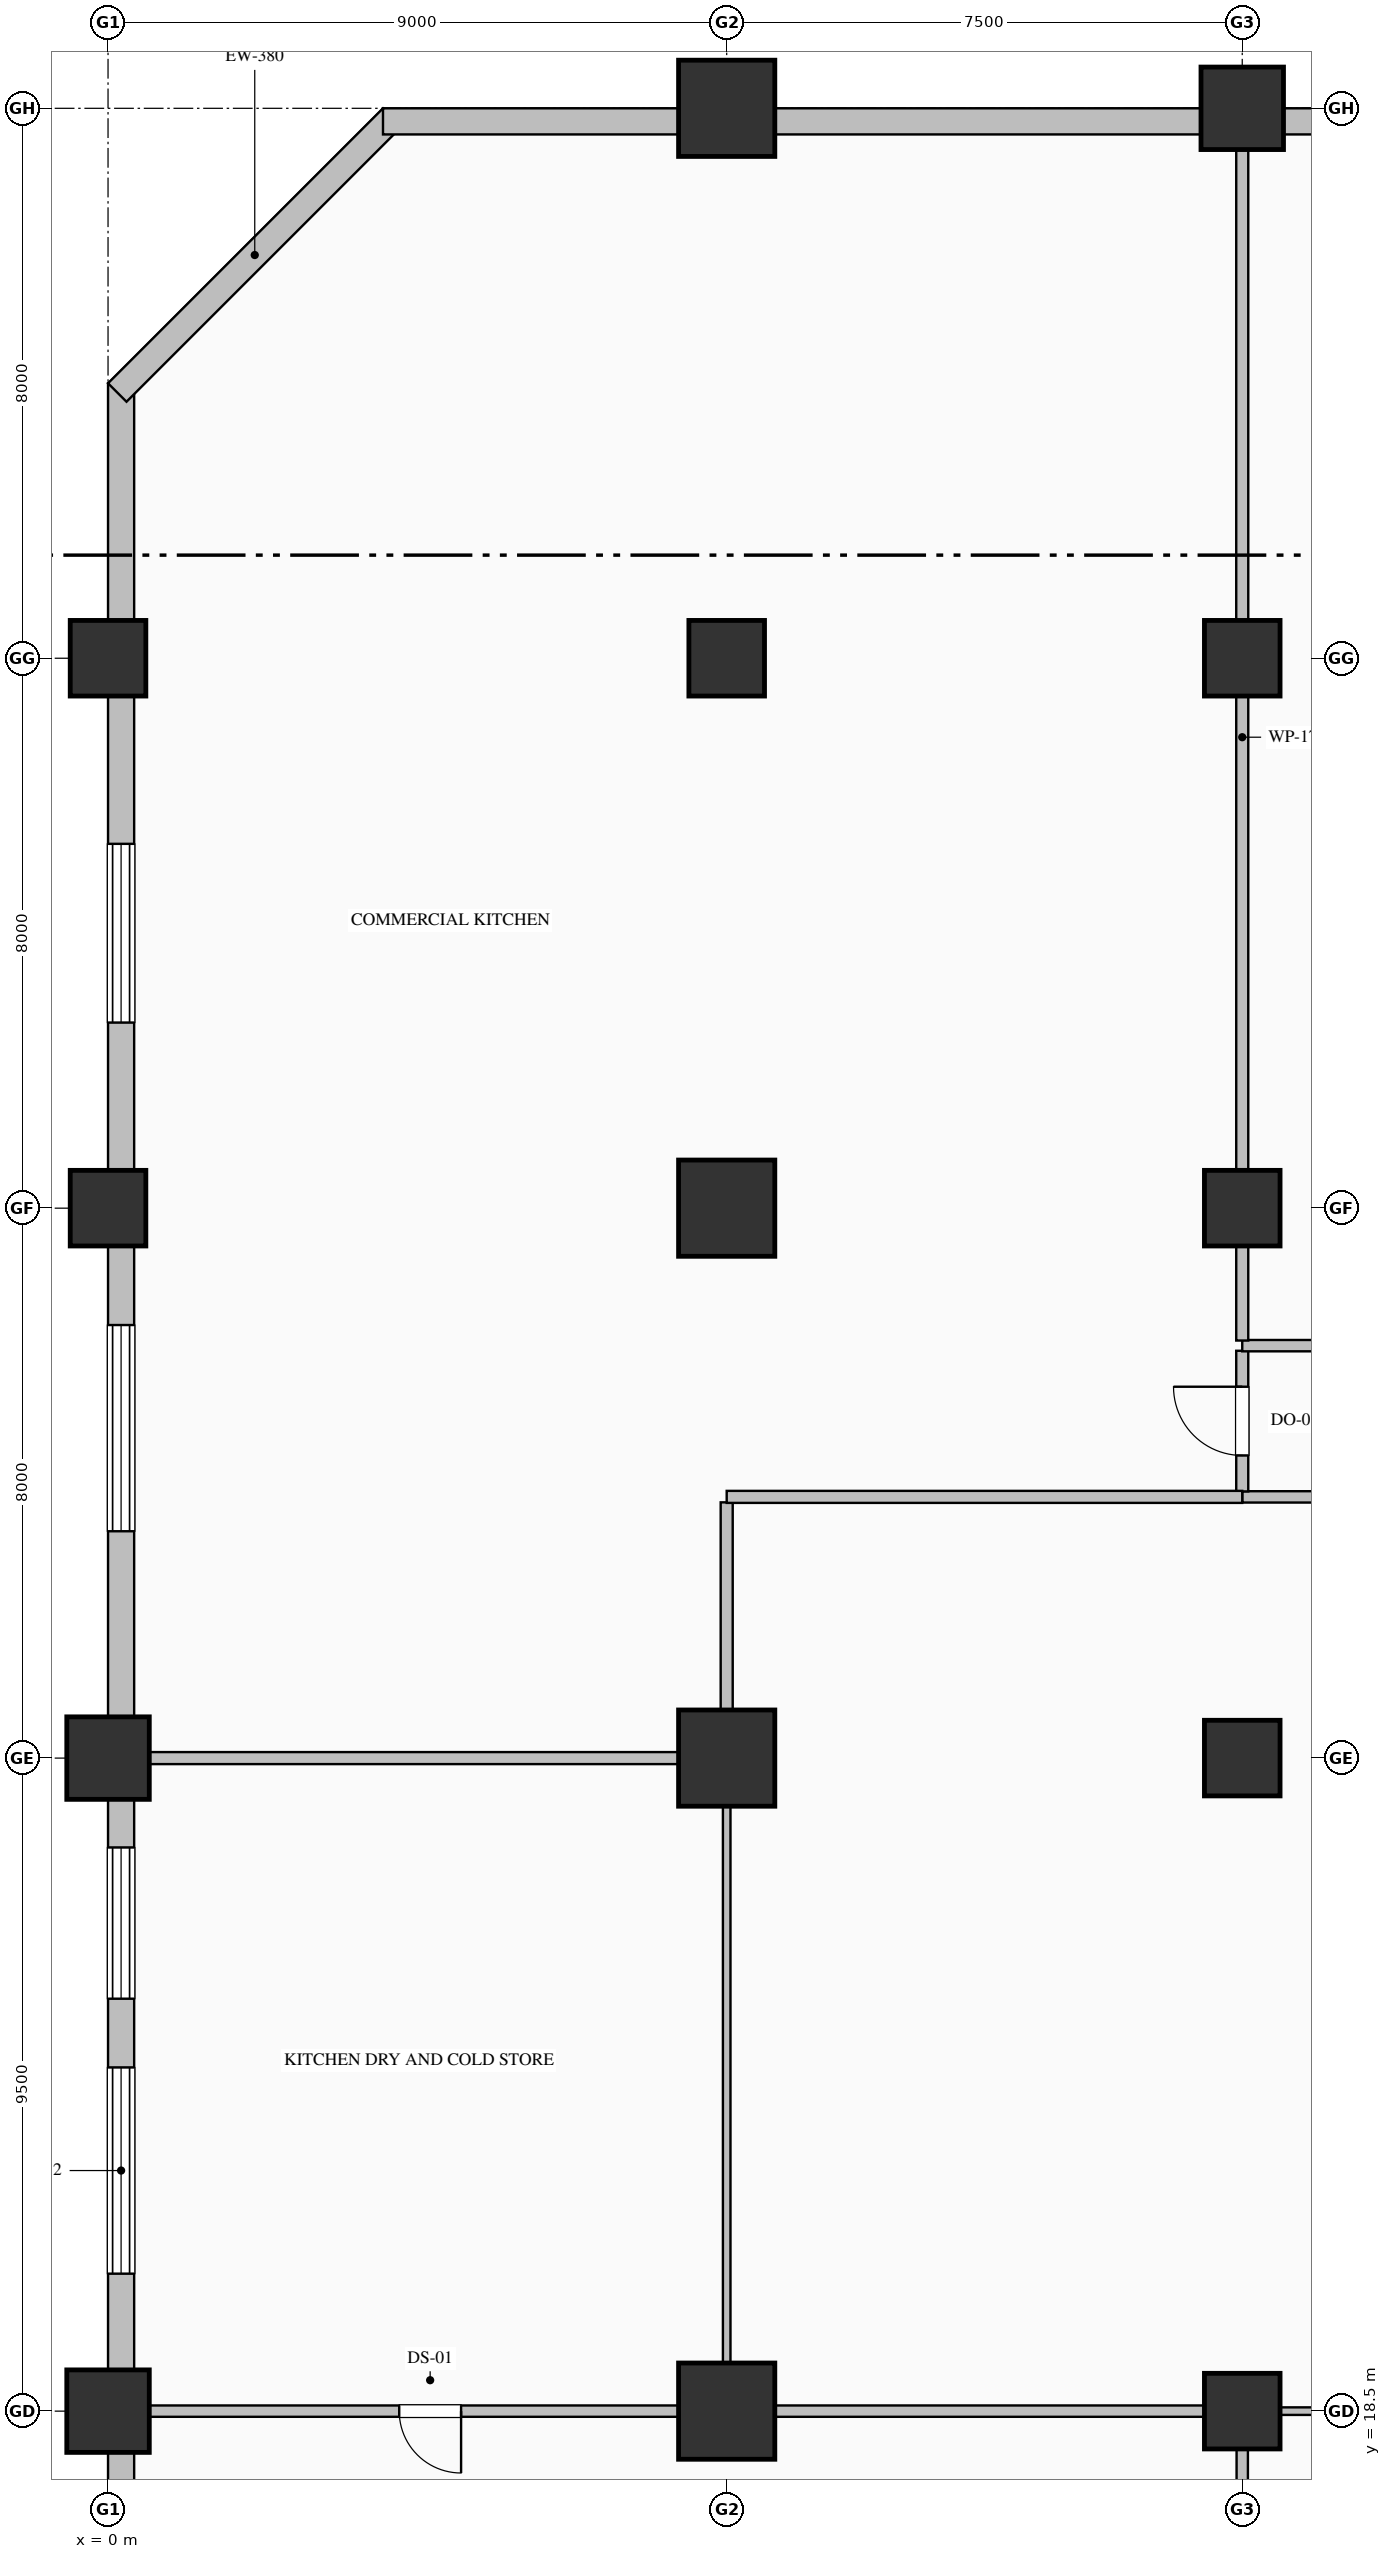
"""IFC4 building model, lengths in metres.
Left out: names, types, materials, properties, quantities, classifications, styles, units other than length and angle.
Written with IfcOpenShell. Run it as: python <this file> out.ifc"""

import sys

from ifc_helpers import new_model, si_unit, direction, frame, frame_2d, origin, origin_2d, place, context, subcontext, project, spatial, rectangle, hollow_rectangle, hollow_circle, extrude, element, fill, save


model = new_model("IFC4")
c1 = context("Model", 3, precision=1e-05, world=origin(), true_north=direction((0.0, 1.0)))
c2 = subcontext(c1, "Body", "Model", "MODEL_VIEW")
j1 = project(units=[si_unit("LENGTHUNIT", "METRE"), si_unit("PLANEANGLEUNIT", "RADIAN")], contexts=[c1])
p1 = place(None, origin())
s1 = spatial("IfcSite", under=j1, at=p1, CompositionType="ELEMENT")
p2 = place(p1, origin())
s2 = spatial("IfcBuilding", under=s1, at=p2, CompositionType="ELEMENT")
p3 = place(p2, frame((0.0, 0.0, 22.8)))
s3 = spatial("IfcBuildingStorey", under=s2, at=p3, CompositionType="ELEMENT", Elevation=22.8)
for number, where, z_axis, x_axis in (
    (1, (0.0, 18.5, 0.0), (0.0, 0.0, 1.0), (1.0, 0.0, 0.0)),
    (2, (0.0, 28.0, 0.0), (0.0, 0.0, 1.0), (1.0, 0.0, 0.0)),
):
    element("IfcColumn", number, at=place(p3, frame(where, z_axis=z_axis, x_axis=x_axis)), inside=s3, PredefinedType="COLUMN", context=c2, shape_type="SweptSolid", body=[
        extrude(hollow_circle(Radius=0.6, WallThickness=0.04, at=origin_2d()), origin(), (0.0, 0.0, 1.0), 5.4),
    ])
for number, where, z_axis, x_axis in (
    (3, (0.0, 36.0, 0.0), (0.0, 0.0, 1.0), (1.0, 0.0, 0.0)),
    (4, (0.0, 44.0, 0.0), (0.0, 0.0, 1.0), (1.0, 0.0, 0.0)),
):
    element("IfcColumn", number, at=place(p3, frame(where, z_axis=z_axis, x_axis=x_axis)), inside=s3, PredefinedType="COLUMN", context=c2, shape_type="SweptSolid", body=[
        extrude(hollow_rectangle(XDim=1.1, YDim=1.1, WallThickness=0.04, at=origin_2d()), origin(), (0.0, 0.0, 1.0), 5.4),
    ])
for number, where, z_axis, x_axis in (
    (5, (9.0, 18.5, 0.0), (0.0, 0.0, 1.0), (1.0, 0.0, 0.0)),
    (6, (9.0, 28.0, 0.0), (0.0, 0.0, 1.0), (1.0, 0.0, 0.0)),
    (7, (9.0, 36.0, 0.0), (0.0, 0.0, 1.0), (1.0, 0.0, 0.0)),
):
    element("IfcColumn", number, at=place(p3, frame(where, z_axis=z_axis, x_axis=x_axis)), inside=s3, PredefinedType="COLUMN", context=c2, shape_type="SweptSolid", body=[
        extrude(hollow_rectangle(XDim=1.4, YDim=1.4, WallThickness=0.05, at=origin_2d()), origin(), (0.0, 0.0, 1.0), 5.4),
    ])
p4 = place(p3, frame((9.0, 44.0, 0.0), z_axis=(0.0, 0.0, 1.0), x_axis=(1.0, 0.0, 0.0)))
e8 = element("IfcColumn", 8, at=p4, inside=s3, PredefinedType="COLUMN", context=c2, shape_type="SweptSolid", body=[
    extrude(rectangle(XDim=1.1, YDim=1.1, at=origin_2d()), origin(), (0.0, 0.0, 1.0), 5.4),
])
p5 = place(p3, frame((9.0, 52.0, 0.0), z_axis=(0.0, 0.0, 1.0), x_axis=(1.0, 0.0, 0.0)))
e9 = element("IfcColumn", 9, at=p5, inside=s3, PredefinedType="COLUMN", context=c2, shape_type="SweptSolid", body=[
    extrude(hollow_rectangle(XDim=1.4, YDim=1.4, WallThickness=0.05, at=origin_2d()), origin(), (0.0, 0.0, 1.0), 5.4),
])
for number, where, z_axis, x_axis in (
    (10, (16.5, 18.5, 0.0), (0.0, 0.0, 1.0), (1.0, 0.0, 0.0)),
    (11, (16.5, 28.0, 0.0), (0.0, 0.0, 1.0), (1.0, 0.0, 0.0)),
    (12, (16.5, 36.0, 0.0), (0.0, 0.0, 1.0), (1.0, 0.0, 0.0)),
    (13, (16.5, 44.0, 0.0), (0.0, 0.0, 1.0), (1.0, 0.0, 0.0)),
):
    element("IfcColumn", number, at=place(p3, frame(where, z_axis=z_axis, x_axis=x_axis)), inside=s3, PredefinedType="COLUMN", context=c2, shape_type="SweptSolid", body=[
        extrude(rectangle(XDim=1.1, YDim=1.1, at=origin_2d()), origin(), (0.0, 0.0, 1.0), 5.4),
    ])
p6 = place(p3, frame((16.5, 52.0, 0.0), z_axis=(0.0, 0.0, 1.0), x_axis=(1.0, 0.0, 0.0)))
e14 = element("IfcColumn", 14, at=p6, inside=s3, PredefinedType="COLUMN", context=c2, shape_type="SweptSolid", body=[
    extrude(hollow_circle(Radius=0.6, WallThickness=0.04, at=origin_2d()), origin(), (0.0, 0.0, 1.0), 5.4),
])
p7 = place(p3, frame((0.19, 4.0, 0.0), z_axis=(0.0, 0.0, 1.0), x_axis=(0.0, 1.0, 0.0)))
e15 = element("IfcWall", 15, at=p7, inside=s3, PredefinedType="SOLIDWALL", context=c2, shape_type="SweptSolid", body=[
    extrude(rectangle(XDim=44.0, YDim=0.38, at=frame_2d((22.0, 0.0))), origin(), (0.0, 0.0, 1.0), 4.65),
])
p8 = place(p7, frame((2.3, 0.0, 0.85)))
e16 = element("IfcOpeningElement", 16, at=p8, cuts=e15, PredefinedType="OPENING", context=c2, shape_type="SweptSolid", body=[
    extrude(rectangle(XDim=2.6, YDim=3.1, at=frame_2d((1.3, 1.55))), frame((0.0, 0.2, 0.0), z_axis=(0.0, -1.0, 0.0), x_axis=(1.0, 0.0, 0.0)), (0.0, 0.0, 1.0), 0.4),
])
p9 = place(p7, frame((9.7, 0.0, 0.9)))
e17 = element("IfcOpeningElement", 17, at=p9, cuts=e15, PredefinedType="OPENING", context=c2, shape_type="SweptSolid", body=[
    extrude(rectangle(XDim=2.2, YDim=2.65, at=frame_2d((1.1, 1.325))), frame((0.0, 0.2, 0.0), z_axis=(0.0, -1.0, 0.0), x_axis=(1.0, 0.0, 0.0)), (0.0, 0.0, 1.0), 0.4),
])
p10 = place(p7, frame((16.5, 0.0, 0.85)))
e18 = element("IfcOpeningElement", 18, at=p10, cuts=e15, PredefinedType="OPENING", context=c2, shape_type="SweptSolid", body=[
    extrude(rectangle(XDim=3.0, YDim=3.2, at=frame_2d((1.5, 1.6))), frame((0.0, 0.2, 0.0), z_axis=(0.0, -1.0, 0.0), x_axis=(1.0, 0.0, 0.0)), (0.0, 0.0, 1.0), 0.4),
])
p11 = place(p7, frame((20.5, 0.0, 0.9)))
e19 = element("IfcOpeningElement", 19, at=p11, cuts=e15, PredefinedType="OPENING", context=c2, shape_type="SweptSolid", body=[
    extrude(rectangle(XDim=2.2, YDim=2.65, at=frame_2d((1.1, 1.325))), frame((0.0, 0.2, 0.0), z_axis=(0.0, -1.0, 0.0), x_axis=(1.0, 0.0, 0.0)), (0.0, 0.0, 1.0), 0.4),
])
p12 = place(p7, frame((27.3, 0.0, 0.85)))
e20 = element("IfcOpeningElement", 20, at=p12, cuts=e15, PredefinedType="OPENING", context=c2, shape_type="SweptSolid", body=[
    extrude(rectangle(XDim=3.0, YDim=3.2, at=frame_2d((1.5, 1.6))), frame((0.0, 0.2, 0.0), z_axis=(0.0, -1.0, 0.0), x_axis=(1.0, 0.0, 0.0)), (0.0, 0.0, 1.0), 0.4),
])
p13 = place(p7, frame((34.7, 0.0, 0.85)))
e21 = element("IfcOpeningElement", 21, at=p13, cuts=e15, PredefinedType="OPENING", context=c2, shape_type="SweptSolid", body=[
    extrude(rectangle(XDim=2.6, YDim=3.1, at=frame_2d((1.3, 1.55))), frame((0.0, 0.2, 0.0), z_axis=(0.0, -1.0, 0.0), x_axis=(1.0, 0.0, 0.0)), (0.0, 0.0, 1.0), 0.4),
])
p14 = place(p3, frame((0.134, 47.866, 0.0), z_axis=(0.0, 0.0, 1.0), x_axis=(0.707106781187, 0.707106781187, 0.0)))
e22 = element("IfcWall", 22, at=p14, inside=s3, PredefinedType="SOLIDWALL", context=c2, shape_type="SweptSolid", body=[
    extrude(rectangle(XDim=5.657, YDim=0.38, at=frame_2d((2.828, 0.0))), origin(), (0.0, 0.0, 1.0), 5.15),
])
p15 = place(p3, frame((4.0, 51.81, 0.0), z_axis=(0.0, 0.0, 1.0), x_axis=(1.0, 0.0, 0.0)))
e23 = element("IfcWall", 23, at=p15, inside=s3, PredefinedType="SOLIDWALL", context=c2, shape_type="SweptSolid", body=[
    extrude(rectangle(XDim=36.52, YDim=0.38, at=frame_2d((18.26, 0.0))), origin(), (0.0, 0.0, 1.0), 4.65),
])
p16 = place(p15, frame((16.7, 0.0, 0.85)))
e24 = element("IfcOpeningElement", 24, at=p16, cuts=e23, PredefinedType="OPENING", context=c2, shape_type="SweptSolid", body=[
    extrude(rectangle(XDim=2.6, YDim=3.1, at=frame_2d((1.3, 1.55))), frame((0.0, 0.2, 0.0), z_axis=(0.0, -1.0, 0.0), x_axis=(1.0, 0.0, 0.0)), (0.0, 0.0, 1.0), 0.4),
])
p17 = place(p15, frame((24.1, 0.0, 0.9)))
e25 = element("IfcOpeningElement", 25, at=p17, cuts=e23, PredefinedType="OPENING", context=c2, shape_type="SweptSolid", body=[
    extrude(rectangle(XDim=2.2, YDim=2.65, at=frame_2d((1.1, 1.325))), frame((0.0, 0.2, 0.0), z_axis=(0.0, -1.0, 0.0), x_axis=(1.0, 0.0, 0.0)), (0.0, 0.0, 1.0), 0.4),
])
p18 = place(p3, frame((48.5, 31.8, 0.0), z_axis=(0.0, 0.0, 1.0), x_axis=(-1.0, 0.0, 0.0)))
e26 = element("IfcWall", 26, at=p18, inside=s3, PredefinedType="PARTITIONING", context=c2, shape_type="SweptSolid", body=[
    extrude(rectangle(XDim=32.0, YDim=0.165, at=frame_2d((16.0, 0.0))), origin(), (0.0, 0.0, 1.0), 5.15),
])
p19 = place(p18, frame((15.2, 0.0, 0.0)))
e27 = element("IfcOpeningElement", 27, at=p19, cuts=e26, PredefinedType="OPENING", context=c2, shape_type="SweptSolid", body=[
    extrude(rectangle(XDim=1.6, YDim=2.25, at=frame_2d((0.8, 1.125))), frame((0.0, 0.093, 0.0), z_axis=(0.0, -1.0, 0.0), x_axis=(1.0, 0.0, 0.0)), (0.0, 0.0, 1.0), 0.185),
])
p20 = place(p3, frame((16.5, 31.879, 0.0), z_axis=(0.0, 0.0, 1.0), x_axis=(0.0, 1.0, 0.0)))
e28 = element("IfcWall", 28, at=p20, inside=s3, PredefinedType="PARTITIONING", context=c2, shape_type="SweptSolid", body=[
    extrude(rectangle(XDim=2.046, YDim=0.175, at=frame_2d((1.023, 0.0))), origin(), (0.0, 0.0, 1.0), 4.442),
])
p21 = place(p20, frame((0.523, 0.0, 0.0)))
e29 = element("IfcOpeningElement", 29, at=p21, cuts=e28, PredefinedType="OPENING", context=c2, shape_type="SweptSolid", body=[
    extrude(rectangle(XDim=1.0, YDim=2.15, at=frame_2d((0.5, 1.075))), frame((0.0, 0.098, 0.0), z_axis=(0.0, -1.0, 0.0), x_axis=(1.0, 0.0, 0.0)), (0.0, 0.0, 1.0), 0.195),
])
p22 = place(p3, frame((16.5, 34.0, 0.0), z_axis=(0.0, 0.0, 1.0), x_axis=(1.0, 0.0, 0.0)))
e30 = element("IfcWall", 30, at=p22, inside=s3, PredefinedType="PARTITIONING", context=c2, shape_type="SweptSolid", body=[
    extrude(rectangle(XDim=18.9, YDim=0.165, at=frame_2d((9.45, 0.0))), origin(), (0.0, 0.0, 1.0), 5.15),
])
p23 = place(p22, frame((8.95, 0.0, 0.0)))
e31 = element("IfcOpeningElement", 31, at=p23, cuts=e30, PredefinedType="OPENING", context=c2, shape_type="SweptSolid", body=[
    extrude(rectangle(XDim=1.0, YDim=2.15, at=frame_2d((0.5, 1.075))), frame((0.0, 0.093, 0.0), z_axis=(0.0, -1.0, 0.0), x_axis=(1.0, 0.0, 0.0)), (0.0, 0.0, 1.0), 0.185),
])
p24 = place(p3, frame((48.5, 18.5, 0.0), z_axis=(0.0, 0.0, 1.0), x_axis=(-1.0, 0.0, 0.0)))
e32 = element("IfcWall", 32, at=p24, inside=s3, PredefinedType="MOVABLE", context=c2, shape_type="SweptSolid", body=[
    extrude(rectangle(XDim=32.0, YDim=0.11, at=frame_2d((16.0, 0.0))), origin(), (0.0, 0.0, 1.0), 4.442),
])
p25 = place(p3, frame((9.0, 28.08, 0.0), z_axis=(0.0, 0.0, 1.0), x_axis=(0.0, 1.0, 0.0)))
e33 = element("IfcWall", 33, at=p25, inside=s3, PredefinedType="PARTITIONING", context=c2, shape_type="SweptSolid", body=[
    extrude(rectangle(XDim=3.641, YDim=0.175, at=frame_2d((1.82, 0.0))), origin(), (0.0, 0.0, 1.0), 4.442),
])
p26 = place(p3, frame((9.0, 31.8, 0.0), z_axis=(0.0, 0.0, 1.0), x_axis=(1.0, 0.0, 0.0)))
e34 = element("IfcWall", 34, at=p26, inside=s3, PredefinedType="PARTITIONING", context=c2, shape_type="SweptSolid", body=[
    extrude(rectangle(XDim=7.5, YDim=0.175, at=frame_2d((3.75, 0.0))), origin(), (0.0, 0.0, 1.0), 5.15),
])
p27 = place(p3, frame((9.0, 18.574, 0.0), z_axis=(0.0, 0.0, 1.0), x_axis=(0.0, 1.0, 0.0)))
e35 = element("IfcWall", 35, at=p27, inside=s3, PredefinedType="MOVABLE", context=c2, shape_type="SweptSolid", body=[
    extrude(rectangle(XDim=9.346, YDim=0.11, at=frame_2d((4.673, 0.0))), origin(), (0.0, 0.0, 1.0), 4.692),
])
p28 = place(p3, frame((16.5, 18.5, 0.0), z_axis=(0.0, 0.0, 1.0), x_axis=(-1.0, 0.0, 0.0)))
e36 = element("IfcWall", 36, at=p28, inside=s3, PredefinedType="PARTITIONING", context=c2, shape_type="SweptSolid", body=[
    extrude(rectangle(XDim=7.5, YDim=0.165, at=frame_2d((3.75, 0.0))), origin(), (0.0, 0.0, 1.0), 5.15),
])
p29 = place(p3, frame((16.5, 16.382, 0.0), z_axis=(0.0, 0.0, 1.0), x_axis=(0.0, 1.0, 0.0)))
e37 = element("IfcWall", 37, at=p29, inside=s3, PredefinedType="PARTITIONING", context=c2, shape_type="SweptSolid", body=[
    extrude(rectangle(XDim=2.043, YDim=0.165, at=frame_2d((1.022, 0.0))), origin(), (0.0, 0.0, 1.0), 5.15),
])
p30 = place(p3, frame((9.0, 28.0, 0.0), z_axis=(0.0, 0.0, 1.0), x_axis=(-1.0, 0.0, 0.0)))
e38 = element("IfcWall", 38, at=p30, inside=s3, PredefinedType="PARTITIONING", context=c2, shape_type="SweptSolid", body=[
    extrude(rectangle(XDim=8.628, YDim=0.175, at=frame_2d((4.314, 0.0))), origin(), (0.0, 0.0, 1.0), 4.642),
])
p31 = place(p3, frame((16.5, 51.628, 0.0), z_axis=(0.0, 0.0, 1.0), x_axis=(0.0, -1.0, 0.0)))
e39 = element("IfcWall", 39, at=p31, inside=s3, PredefinedType="PARTITIONING", context=c2, shape_type="SweptSolid", body=[
    extrude(rectangle(XDim=17.553, YDim=0.175, at=frame_2d((8.777, 0.0))), origin(), (0.0, 0.0, 1.0), 4.442),
])
p32 = place(p3, frame((9.0, 18.5, 0.0), z_axis=(0.0, 0.0, 1.0), x_axis=(-1.0, 0.0, 0.0)))
e40 = element("IfcWall", 40, at=p32, inside=s3, PredefinedType="PARTITIONING", context=c2, shape_type="SweptSolid", body=[
    extrude(rectangle(XDim=8.628, YDim=0.165, at=frame_2d((4.314, 0.0))), origin(), (0.0, 0.0, 1.0), 5.15),
])
p33 = place(p32, frame((3.864, 0.0, 0.0)))
e41 = element("IfcOpeningElement", 41, at=p33, cuts=e40, PredefinedType="OPENING", context=c2, shape_type="SweptSolid", body=[
    extrude(rectangle(XDim=0.9, YDim=2.15, at=frame_2d((0.45, 1.075))), frame((0.0, 0.093, 0.0), z_axis=(0.0, -1.0, 0.0), x_axis=(1.0, 0.0, 0.0)), (0.0, 0.0, 1.0), 0.185),
])
p34 = place(p10, origin())
e42 = element("IfcWindow", 42, at=p34, inside=s3, PartitioningType="TRIPLE_PANEL_VERTICAL", PredefinedType="WINDOW", context=c2, shape_type="SweptSolid", body=[
    extrude(rectangle(XDim=3.0, YDim=3.2, at=frame_2d((1.5, 1.6))), frame((0.0, 0.15, 0.0), z_axis=(0.0, -1.0, 0.0), x_axis=(1.0, 0.0, 0.0)), (0.0, 0.0, 1.0), 0.06),
])
fill(e18, e42)
p35 = place(p11, origin())
e43 = element("IfcWindow", 43, at=p35, inside=s3, PartitioningType="TRIPLE_PANEL_VERTICAL", PredefinedType="WINDOW", context=c2, shape_type="SweptSolid", body=[
    extrude(rectangle(XDim=2.2, YDim=2.65, at=frame_2d((1.1, 1.325))), frame((0.0, 0.15, 0.0), z_axis=(0.0, -1.0, 0.0), x_axis=(1.0, 0.0, 0.0)), (0.0, 0.0, 1.0), 0.06),
])
fill(e19, e43)
p36 = place(p12, origin())
e44 = element("IfcWindow", 44, at=p36, inside=s3, PartitioningType="TRIPLE_PANEL_VERTICAL", PredefinedType="WINDOW", context=c2, shape_type="SweptSolid", body=[
    extrude(rectangle(XDim=3.0, YDim=3.2, at=frame_2d((1.5, 1.6))), frame((0.0, 0.15, 0.0), z_axis=(0.0, -1.0, 0.0), x_axis=(1.0, 0.0, 0.0)), (0.0, 0.0, 1.0), 0.06),
])
fill(e20, e44)
p37 = place(p13, origin())
e45 = element("IfcWindow", 45, at=p37, inside=s3, PartitioningType="TRIPLE_PANEL_VERTICAL", PredefinedType="WINDOW", context=c2, shape_type="SweptSolid", body=[
    extrude(rectangle(XDim=2.6, YDim=3.1, at=frame_2d((1.3, 1.55))), frame((0.0, 0.15, 0.0), z_axis=(0.0, -1.0, 0.0), x_axis=(1.0, 0.0, 0.0)), (0.0, 0.0, 1.0), 0.06),
])
fill(e21, e45)
p38 = place(p21, origin())
e46 = element("IfcDoor", 46, at=p38, inside=s3, OperationType="SINGLE_SWING_RIGHT", PredefinedType="DOOR", context=c2, shape_type="SweptSolid", body=[
    extrude(rectangle(XDim=1.0, YDim=2.15, at=frame_2d((0.5, 1.075))), frame((0.0, 0.025, 0.0), z_axis=(0.0, -1.0, 0.0), x_axis=(1.0, 0.0, 0.0)), (0.0, 0.0, 1.0), 0.05),
])
fill(e29, e46)
p39 = place(p33, origin())
e47 = element("IfcDoor", 47, at=p39, inside=s3, OperationType="SINGLE_SWING_LEFT", PredefinedType="DOOR", context=c2, shape_type="SweptSolid", body=[
    extrude(rectangle(XDim=0.9, YDim=2.15, at=frame_2d((0.45, 1.075))), frame((0.0, 0.025, 0.0), z_axis=(0.0, -1.0, 0.0), x_axis=(1.0, 0.0, 0.0)), (0.0, 0.0, 1.0), 0.05),
])
fill(e41, e47)
save(model, sys.argv[1])
